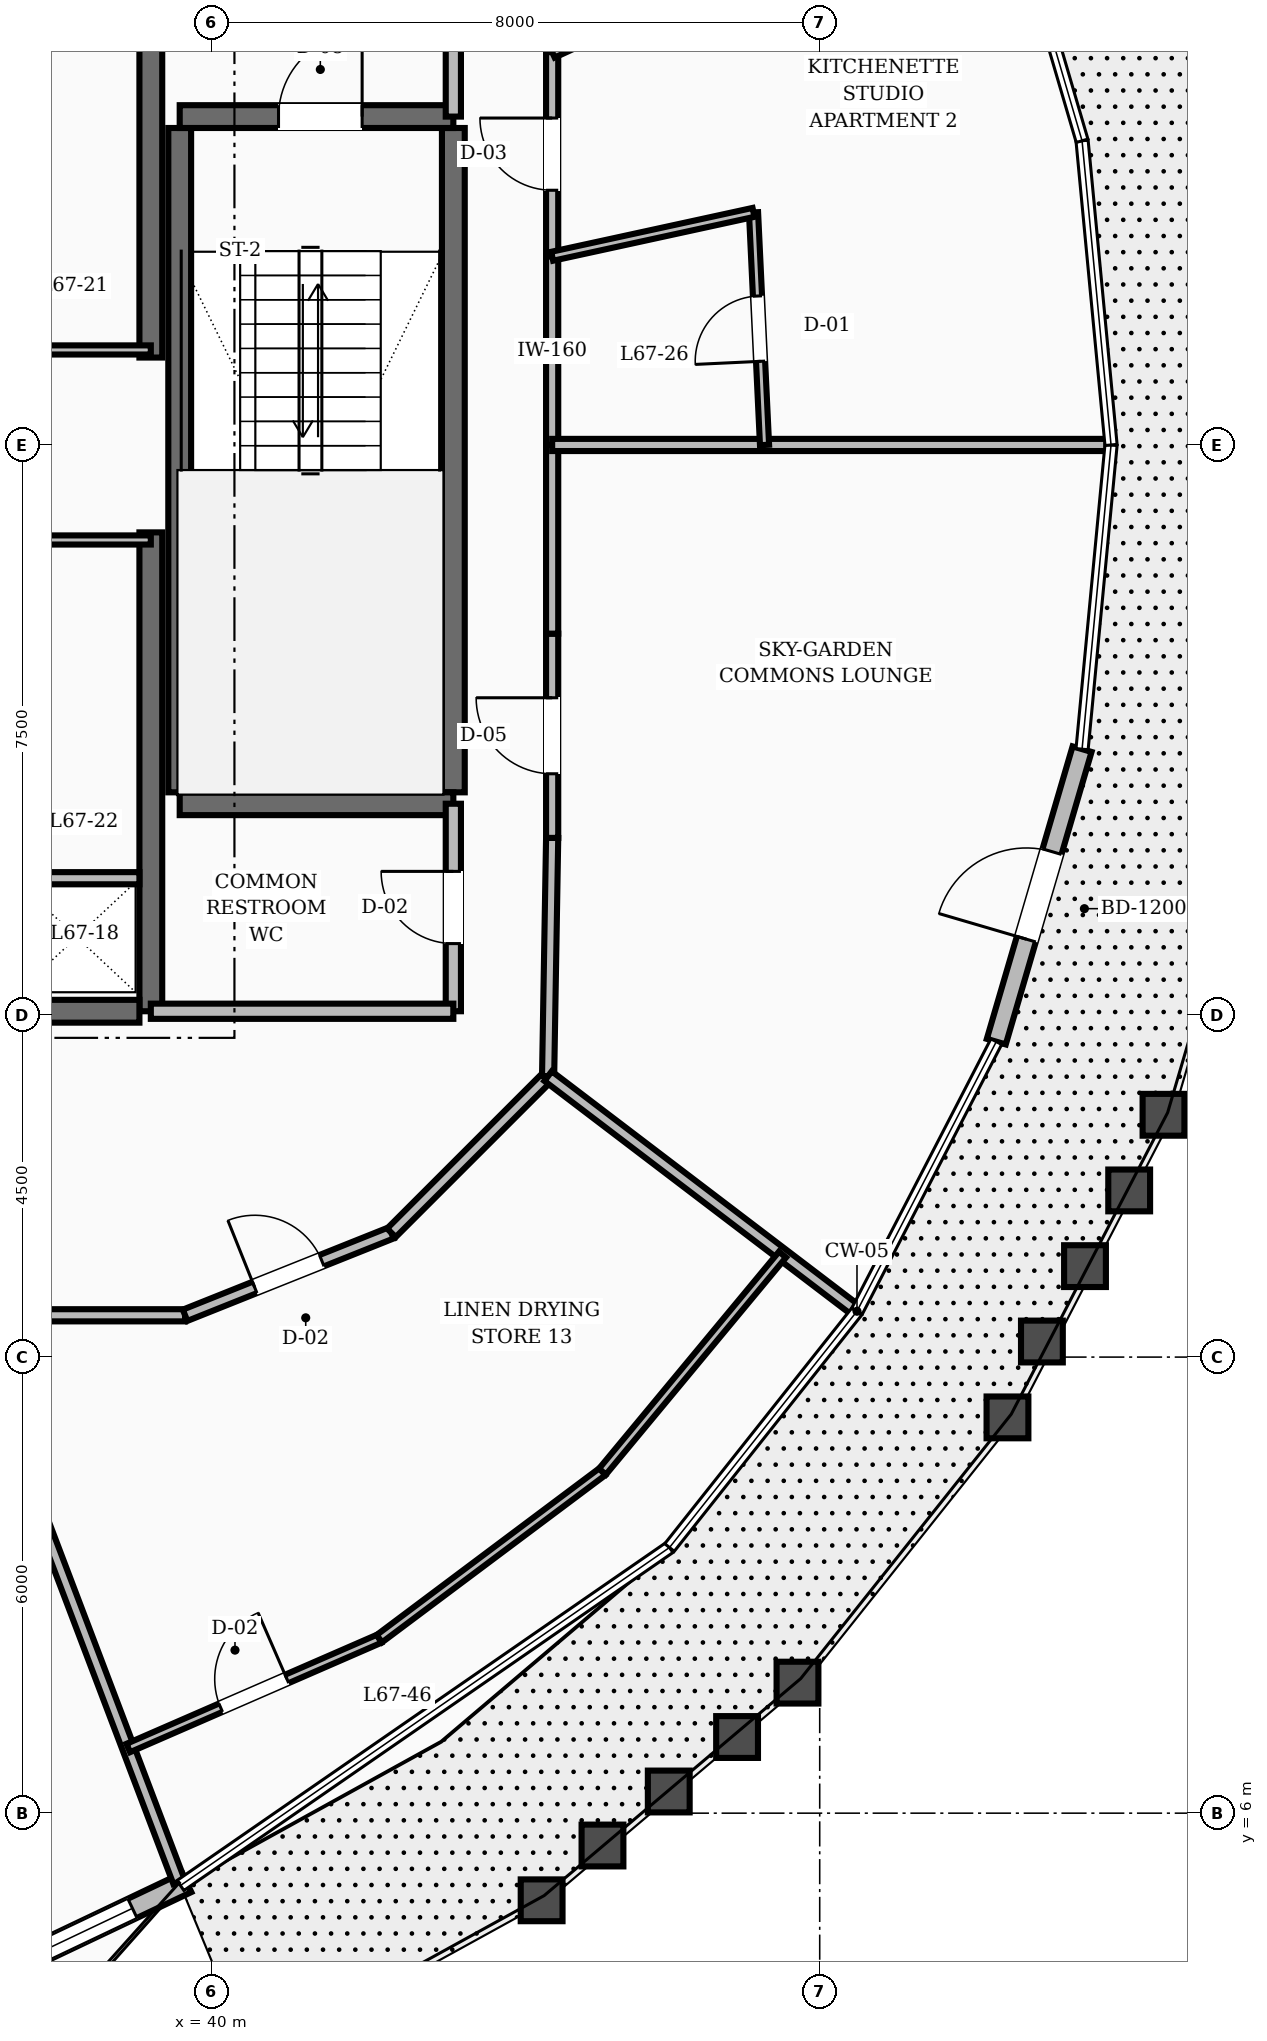
"""IFC4 building model, lengths in metres.
Left out: names, types, materials, properties, quantities, classifications, styles, units other than length and angle.
Written with IfcOpenShell. Run it as: python <this file> out.ifc"""

import sys

from ifc_helpers import new_model, si_unit, direction, frame, frame_2d, origin, place, context, subcontext, project, spatial, rectangle, extrude, element, fill, save


model = new_model("IFC4")
c1 = context("Model", 3, precision=1e-05, world=origin(), true_north=direction((0.0, 1.0)))
c2 = subcontext(c1, "Body", "Model", "MODEL_VIEW")
j1 = project(units=[si_unit("LENGTHUNIT", "METRE"), si_unit("PLANEANGLEUNIT", "RADIAN")], contexts=[c1])
p1 = place(None, origin())
s1 = spatial("IfcSite", under=j1, at=p1, CompositionType="ELEMENT")
p2 = place(p1, origin())
s2 = spatial("IfcBuilding", under=s1, at=p2, CompositionType="ELEMENT")
p3 = place(p2, frame((0.0, 0.0, 258.0)))
s3 = spatial("IfcBuildingStorey", under=s2, at=p3, CompositionType="ELEMENT", Elevation=258.0)
for number, where, z_axis, x_axis in (
    (1, (39.2, 16.55, 0.0), (0.0, 0.0, 1.0), (0.0, 1.0, 0.0)),
    (2, (39.2, 25.15, 0.0), (0.0, 0.0, 1.0), (0.0, 1.0, 0.0)),
):
    element("IfcWall", number, at=place(p3, frame(where, z_axis=z_axis, x_axis=x_axis)), inside=s3, PredefinedType="SHEAR", context=c2, shape_type="SweptSolid", body=[
        extrude(rectangle(XDim=6.3, YDim=0.3, at=frame_2d((3.15, 0.0))), origin(), (0.0, 0.0, 1.0), 3.6),
    ])
p4 = place(p3, frame((35.8, 16.55, 0.0), z_axis=(0.0, 0.0, 1.0), x_axis=(1.0, 0.0, 0.0)))
e3 = element("IfcWall", 3, at=p4, inside=s3, PredefinedType="SHEAR", context=c2, shape_type="SweptSolid", body=[
    extrude(rectangle(XDim=3.25, YDim=0.3, at=frame_2d((1.625, 0.0))), origin(), (0.0, 0.0, 1.0), 3.6),
])
p5 = place(p4, frame((0.3, 0.0, 0.0)))
e4 = element("IfcOpeningElement", 4, at=p5, cuts=e3, PredefinedType="OPENING", context=c2, shape_type="SweptSolid", body=[
    extrude(rectangle(XDim=1.1, YDim=2.1, at=frame_2d((0.55, 1.05))), frame((0.0, 0.16, 0.0), z_axis=(0.0, -1.0, 0.0), x_axis=(1.0, 0.0, 0.0)), (0.0, 0.0, 1.0), 0.32),
])
for number, where, z_axis, x_axis in (
    (5, (43.18, 19.43, 0.0), (0.0, 0.0, 1.0), (0.0, 1.0, 0.0)),
    (6, (39.58, 19.43, 0.0), (0.0, 0.0, 1.0), (0.0, 1.0, 0.0)),
):
    element("IfcWall", number, at=place(p3, frame(where, z_axis=z_axis, x_axis=x_axis)), inside=s3, PredefinedType="SHEAR", context=c2, shape_type="SweptSolid", body=[
        extrude(rectangle(XDim=8.74, YDim=0.3, at=frame_2d((4.37, 0.0))), origin(), (0.0, 0.0, 1.0), 3.6),
    ])
p6 = place(p3, frame((39.58, 19.28, 0.0), z_axis=(0.0, 0.0, 1.0), x_axis=(1.0, 0.0, 0.0)))
e7 = element("IfcWall", 7, at=p6, inside=s3, PredefinedType="SHEAR", context=c2, shape_type="SweptSolid", body=[
    extrude(rectangle(XDim=3.6, YDim=0.3, at=frame_2d((1.8, 0.0))), origin(), (0.0, 0.0, 1.0), 3.6),
])
p7 = place(p3, frame((39.58, 28.32, 0.0), z_axis=(0.0, 0.0, 1.0), x_axis=(1.0, 0.0, 0.0)))
e8 = element("IfcWall", 8, at=p7, inside=s3, PredefinedType="SHEAR", context=c2, shape_type="SweptSolid", body=[
    extrude(rectangle(XDim=3.6, YDim=0.3, at=frame_2d((1.8, 0.0))), origin(), (0.0, 0.0, 1.0), 3.6),
])
p8 = place(p7, frame((1.3, 0.0, 0.0)))
e9 = element("IfcOpeningElement", 9, at=p8, cuts=e8, PredefinedType="OPENING", context=c2, shape_type="SweptSolid", body=[
    extrude(rectangle(XDim=1.1, YDim=2.1, at=frame_2d((0.55, 1.05))), frame((0.0, 0.16, 0.0), z_axis=(0.0, -1.0, 0.0), x_axis=(1.0, 0.0, 0.0)), (0.0, 0.0, 1.0), 0.32),
])
p9 = place(p3, frame((35.979, 3.332, 0.0), z_axis=(0.0, 0.0, 1.0), x_axis=(0.903154871067, 0.429314894765, 0.0)))
e10 = element("IfcWall", 10, at=p9, inside=s3, PredefinedType="STANDARD", context=c2, shape_type="SweptSolid", body=[
    extrude(rectangle(XDim=4.091, YDim=0.28, at=frame_2d((2.045, 0.0))), origin(), (0.0, 0.0, 1.0), 2.88),
])
p10 = place(p9, frame((0.699, 0.0, 0.8)))
e11 = element("IfcOpeningElement", 11, at=p10, cuts=e10, PredefinedType="OPENING", context=c2, shape_type="SweptSolid", body=[
    extrude(rectangle(XDim=2.6, YDim=1.65, at=frame_2d((1.3, 0.825))), frame((0.0, 0.15, 0.0), z_axis=(0.0, -1.0, 0.0), x_axis=(1.0, 0.0, 0.0)), (0.0, 0.0, 1.0), 0.3),
])
p11 = place(p3, frame((50.323, 16.15, 0.0), z_axis=(0.0, 0.0, 1.0), x_axis=(0.281444418765, 0.959577531597, 0.0)))
e12 = element("IfcWall", 12, at=p11, inside=s3, PredefinedType="STANDARD", context=c2, shape_type="SweptSolid", body=[
    extrude(rectangle(XDim=4.01, YDim=0.26, at=frame_2d((2.005, 0.0))), origin(), (0.0, 0.0, 1.0), 2.88),
])
p12 = place(p11, frame((1.405, 0.0, 0.0)))
e13 = element("IfcOpeningElement", 13, at=p12, cuts=e12, PredefinedType="OPENING", context=c2, shape_type="SweptSolid", body=[
    extrude(rectangle(XDim=1.2, YDim=2.15, at=frame_2d((0.6, 1.075))), frame((0.0, 0.14, 0.0), z_axis=(0.0, -1.0, 0.0), x_axis=(1.0, 0.0, 0.0)), (0.0, 0.0, 1.0), 0.28),
])
p13 = place(p3, frame((43.18, 28.32, 0.0), z_axis=(0.0, 0.0, 1.0), x_axis=(0.0, 1.0, 0.0)))
e14 = element("IfcWall", 14, at=p13, inside=s3, PredefinedType="SOLIDWALL", context=c2, shape_type="SweptSolid", body=[
    extrude(rectangle(XDim=3.13, YDim=0.2, at=frame_2d((1.565, 0.0))), origin(), (0.0, 0.0, 1.0), 2.87),
])
p14 = place(p13, frame((1.015, 0.0, 0.0)))
e15 = element("IfcOpeningElement", 15, at=p14, cuts=e14, PredefinedType="OPENING", context=c2, shape_type="SweptSolid", body=[
    extrude(rectangle(XDim=1.1, YDim=2.1, at=frame_2d((0.55, 1.05))), frame((0.0, 0.11, 0.0), z_axis=(0.0, -1.0, 0.0), x_axis=(1.0, 0.0, 0.0)), (0.0, 0.0, 1.0), 0.22),
])
p15 = place(p3, frame((43.18, 16.55, 0.0), z_axis=(0.0, 0.0, 1.0), x_axis=(0.0, 1.0, 0.0)))
e16 = element("IfcWall", 16, at=p15, inside=s3, PredefinedType="SOLIDWALL", context=c2, shape_type="SweptSolid", body=[
    extrude(rectangle(XDim=2.73, YDim=0.2, at=frame_2d((1.365, 0.0))), origin(), (0.0, 0.0, 1.0), 2.87),
])
p16 = place(p15, frame((0.89, 0.0, 0.0)))
e17 = element("IfcOpeningElement", 17, at=p16, cuts=e16, PredefinedType="OPENING", context=c2, shape_type="SweptSolid", body=[
    extrude(rectangle(XDim=0.95, YDim=2.1, at=frame_2d((0.475, 1.05))), frame((0.0, 0.11, 0.0), z_axis=(0.0, -1.0, 0.0), x_axis=(1.0, 0.0, 0.0)), (0.0, 0.0, 1.0), 0.22),
])
p17 = place(p3, frame((39.2, 16.55, 0.0), z_axis=(0.0, 0.0, 1.0), x_axis=(1.0, 0.0, 0.0)))
e18 = element("IfcWall", 18, at=p17, inside=s3, PredefinedType="SOLIDWALL", context=c2, shape_type="SweptSolid", body=[
    extrude(rectangle(XDim=3.98, YDim=0.2, at=frame_2d((1.99, 0.0))), origin(), (0.0, 0.0, 1.0), 2.87),
])
p18 = place(p3, frame((37.4, 18.3, 0.0), z_axis=(0.0, 0.0, 1.0), x_axis=(1.0, 0.0, 0.0)))
e19 = element("IfcWall", 19, at=p18, inside=s3, PredefinedType="SOLIDWALL", context=c2, shape_type="SweptSolid", body=[
    extrude(rectangle(XDim=1.65, YDim=0.16, at=frame_2d((0.825, 0.0))), origin(), (0.0, 0.0, 1.0), 2.87),
])
for number, where, z_axis, x_axis in (
    (20, (37.4, 25.25, 0.0), (0.0, 0.0, 1.0), (1.0, 0.0, 0.0)),
    (21, (37.4, 22.75, 0.0), (0.0, 0.0, 1.0), (1.0, 0.0, 0.0)),
):
    element("IfcWall", number, at=place(p3, frame(where, z_axis=z_axis, x_axis=x_axis)), inside=s3, PredefinedType="PARTITIONING", context=c2, shape_type="SweptSolid", body=[
        extrude(rectangle(XDim=1.8, YDim=0.12, at=frame_2d((0.9, 0.0))), origin(), (0.0, 0.0, 1.0), 2.87),
    ])
p19 = place(p3, frame((44.48, 24.0, 0.0), z_axis=(0.0, 0.0, 1.0), x_axis=(0.0, 1.0, 0.0)))
e22 = element("IfcWall", 22, at=p19, inside=s3, PredefinedType="SOLIDWALL", context=c2, shape_type="SweptSolid", body=[
    extrude(rectangle(XDim=2.482, YDim=0.16, at=frame_2d((1.241, 0.0))), origin(), (0.0, 0.0, 1.0), 2.87),
])
p20 = place(p3, frame((44.48, 26.482, 0.0), z_axis=(0.0, 0.0, 1.0), x_axis=(0.0, 1.0, 0.0)))
e23 = element("IfcWall", 23, at=p20, inside=s3, PredefinedType="SOLIDWALL", context=c2, shape_type="SweptSolid", body=[
    extrude(rectangle(XDim=2.687, YDim=0.16, at=frame_2d((1.344, 0.0))), origin(), (0.0, 0.0, 1.0), 2.87),
])
p21 = place(p20, frame((0.868, 0.0, 0.0)))
e24 = element("IfcOpeningElement", 24, at=p21, cuts=e23, PredefinedType="OPENING", context=c2, shape_type="SweptSolid", body=[
    extrude(rectangle(XDim=0.95, YDim=2.1, at=frame_2d((0.475, 1.05))), frame((0.0, 0.09, 0.0), z_axis=(0.0, -1.0, 0.0), x_axis=(1.0, 0.0, 0.0)), (0.0, 0.0, 1.0), 0.18),
])
p22 = place(p3, frame((44.48, 29.169, 0.0), z_axis=(0.0, 0.0, 1.0), x_axis=(-0.016981035134, 0.999855811828, 0.0)))
e25 = element("IfcWall", 25, at=p22, inside=s3, PredefinedType="SOLIDWALL", context=c2, shape_type="SweptSolid", body=[
    extrude(rectangle(XDim=3.134, YDim=0.16, at=frame_2d((1.567, 0.0))), origin(), (0.0, 0.0, 1.0), 2.87),
])
p23 = place(p3, frame((36.743, 12.55, 0.0), z_axis=(0.0, 0.0, 1.0), x_axis=(1.0, 0.0, 0.0)))
e26 = element("IfcWall", 26, at=p23, inside=s3, PredefinedType="SOLIDWALL", context=c2, shape_type="SweptSolid", body=[
    extrude(rectangle(XDim=2.908, YDim=0.16, at=frame_2d((1.454, 0.0))), origin(), (0.0, 0.0, 1.0), 2.87),
])
p24 = place(p3, frame((39.651, 12.55, 0.0), z_axis=(0.0, 0.0, 1.0), x_axis=(0.92856882165, 0.371160266542, 0.0)))
e27 = element("IfcWall", 27, at=p24, inside=s3, PredefinedType="SOLIDWALL", context=c2, shape_type="SweptSolid", body=[
    extrude(rectangle(XDim=2.923, YDim=0.16, at=frame_2d((1.461, 0.0))), origin(), (0.0, 0.0, 1.0), 2.87),
])
p25 = place(p24, frame((0.987, 0.0, 0.0)))
e28 = element("IfcOpeningElement", 28, at=p25, cuts=e27, PredefinedType="OPENING", context=c2, shape_type="SweptSolid", body=[
    extrude(rectangle(XDim=0.95, YDim=2.1, at=frame_2d((0.475, 1.05))), frame((0.0, 0.09, 0.0), z_axis=(0.0, -1.0, 0.0), x_axis=(1.0, 0.0, 0.0)), (0.0, 0.0, 1.0), 0.18),
])
p26 = place(p3, frame((42.365, 13.635, 0.0), z_axis=(0.0, 0.0, 1.0), x_axis=(0.707106781187, 0.707106781187, 0.0)))
e29 = element("IfcWall", 29, at=p26, inside=s3, PredefinedType="SOLIDWALL", context=c2, shape_type="SweptSolid", body=[
    extrude(rectangle(XDim=2.916, YDim=0.16, at=frame_2d((1.458, 0.0))), origin(), (0.0, 0.0, 1.0), 2.87),
])
p27 = place(p3, frame((44.427, 15.697, 0.0), z_axis=(0.0, 0.0, 1.0), x_axis=(0.016981035134, 0.999855811828, 0.0)))
e30 = element("IfcWall", 30, at=p27, inside=s3, PredefinedType="SOLIDWALL", context=c2, shape_type="SweptSolid", body=[
    extrude(rectangle(XDim=3.134, YDim=0.16, at=frame_2d((1.567, 0.0))), origin(), (0.0, 0.0, 1.0), 2.87),
])
p28 = place(p3, frame((44.48, 18.831, 0.0), z_axis=(0.0, 0.0, 1.0), x_axis=(0.0, 1.0, 0.0)))
e31 = element("IfcWall", 31, at=p28, inside=s3, PredefinedType="SOLIDWALL", context=c2, shape_type="SweptSolid", body=[
    extrude(rectangle(XDim=2.687, YDim=0.16, at=frame_2d((1.344, 0.0))), origin(), (0.0, 0.0, 1.0), 2.87),
])
p29 = place(p28, frame((0.844, 0.0, 0.0)))
e32 = element("IfcOpeningElement", 32, at=p29, cuts=e31, PredefinedType="OPENING", context=c2, shape_type="SweptSolid", body=[
    extrude(rectangle(XDim=1.0, YDim=2.1, at=frame_2d((0.5, 1.05))), frame((0.0, 0.09, 0.0), z_axis=(0.0, -1.0, 0.0), x_axis=(1.0, 0.0, 0.0)), (0.0, 0.0, 1.0), 0.18),
])
p30 = place(p3, frame((44.48, 21.518, 0.0), z_axis=(0.0, 0.0, 1.0), x_axis=(0.0, 1.0, 0.0)))
e33 = element("IfcWall", 33, at=p30, inside=s3, PredefinedType="SOLIDWALL", context=c2, shape_type="SweptSolid", body=[
    extrude(rectangle(XDim=2.482, YDim=0.16, at=frame_2d((1.241, 0.0))), origin(), (0.0, 0.0, 1.0), 2.87),
])
p31 = place(p3, frame((44.427, 15.697, 0.0), z_axis=(0.0, 0.0, 1.0), x_axis=(0.795704263552, -0.605685334943, 0.0)))
e34 = element("IfcWall", 34, at=p31, inside=s3, PredefinedType="SOLIDWALL", context=c2, shape_type="SweptSolid", body=[
    extrude(rectangle(XDim=5.057, YDim=0.16, at=frame_2d((2.529, 0.0))), origin(), (0.0, 0.0, 1.0), 2.87),
])
p32 = place(p3, frame((44.48, 24.0, 0.0), z_axis=(0.0, 0.0, 1.0), x_axis=(1.0, 0.0, 0.0)))
e35 = element("IfcWall", 35, at=p32, inside=s3, PredefinedType="SOLIDWALL", context=c2, shape_type="SweptSolid", body=[
    extrude(rectangle(XDim=7.303, YDim=0.16, at=frame_2d((3.651, 0.0))), origin(), (0.0, 0.0, 1.0), 2.87),
])
p33 = place(p3, frame((47.274, 24.0, 0.0), z_axis=(0.0, 0.0, 1.0), x_axis=(-0.047341736084, 0.998878751413, 0.0)))
e36 = element("IfcWall", 36, at=p33, inside=s3, PredefinedType="PARTITIONING", context=c2, shape_type="SweptSolid", body=[
    extrude(rectangle(XDim=3.063, YDim=0.12, at=frame_2d((1.532, 0.0))), origin(), (0.0, 0.0, 1.0), 2.87),
])
p34 = place(p33, frame((1.102, 0.0, 0.0)))
e37 = element("IfcOpeningElement", 37, at=p34, cuts=e36, PredefinedType="OPENING", context=c2, shape_type="SweptSolid", body=[
    extrude(rectangle(XDim=0.86, YDim=2.1, at=frame_2d((0.43, 1.05))), frame((0.0, 0.07, 0.0), z_axis=(0.0, -1.0, 0.0), x_axis=(1.0, 0.0, 0.0)), (0.0, 0.0, 1.0), 0.14),
])
p35 = place(p3, frame((44.48, 26.482, 0.0), z_axis=(0.0, 0.0, 1.0), x_axis=(0.977062450347, 0.212952971622, 0.0)))
e38 = element("IfcWall", 38, at=p35, inside=s3, PredefinedType="PARTITIONING", context=c2, shape_type="SweptSolid", body=[
    extrude(rectangle(XDim=2.711, YDim=0.12, at=frame_2d((1.356, 0.0))), origin(), (0.0, 0.0, 1.0), 2.87),
])
p36 = place(p3, frame((44.48, 29.169, 0.0), z_axis=(0.0, 0.0, 1.0), x_axis=(0.908905892695, 0.417001292833, 0.0)))
e39 = element("IfcWall", 39, at=p36, inside=s3, PredefinedType="SOLIDWALL", context=c2, shape_type="SweptSolid", body=[
    extrude(rectangle(XDim=6.379, YDim=0.16, at=frame_2d((3.189, 0.0))), origin(), (0.0, 0.0, 1.0), 2.87),
])
p37 = place(p3, frame((36.743, 12.55, 0.0), z_axis=(0.0, 0.0, 1.0), x_axis=(0.354824979058, -0.934932743162, 0.0)))
e40 = element("IfcWall", 40, at=p37, inside=s3, PredefinedType="SOLIDWALL", context=c2, shape_type="SweptSolid", body=[
    extrude(rectangle(XDim=7.974, YDim=0.16, at=frame_2d((3.987, 0.0))), origin(), (0.0, 0.0, 1.0), 2.87),
])
p38 = place(p3, frame((38.903, 6.857, 0.0), z_axis=(0.0, 0.0, 1.0), x_axis=(0.916826396338, 0.399286061588, 0.0)))
e41 = element("IfcWall", 41, at=p38, inside=s3, PredefinedType="PARTITIONING", context=c2, shape_type="SweptSolid", body=[
    extrude(rectangle(XDim=3.603, YDim=0.12, at=frame_2d((1.801, 0.0))), origin(), (0.0, 0.0, 1.0), 2.87),
])
p39 = place(p38, frame((1.326, 0.0, 0.0)))
e42 = element("IfcOpeningElement", 42, at=p39, cuts=e41, PredefinedType="OPENING", context=c2, shape_type="SweptSolid", body=[
    extrude(rectangle(XDim=0.95, YDim=2.1, at=frame_2d((0.475, 1.05))), frame((0.0, 0.07, 0.0), z_axis=(0.0, -1.0, 0.0), x_axis=(1.0, 0.0, 0.0)), (0.0, 0.0, 1.0), 0.14),
])
p40 = place(p3, frame((42.206, 8.296, 0.0), z_axis=(0.0, 0.0, 1.0), x_axis=(0.800519042287, 0.599307319274, 0.0)))
e43 = element("IfcWall", 43, at=p40, inside=s3, PredefinedType="PARTITIONING", context=c2, shape_type="SweptSolid", body=[
    extrude(rectangle(XDim=3.667, YDim=0.12, at=frame_2d((1.833, 0.0))), origin(), (0.0, 0.0, 1.0), 2.87),
])
p41 = place(p3, frame((45.142, 10.493, 0.0), z_axis=(0.0, 0.0, 1.0), x_axis=(0.638390065539, 0.769713014195, 0.0)))
e44 = element("IfcWall", 44, at=p41, inside=s3, PredefinedType="PARTITIONING", context=c2, shape_type="SweptSolid", body=[
    extrude(rectangle(XDim=3.711, YDim=0.12, at=frame_2d((1.855, 0.0))), origin(), (0.0, 0.0, 1.0), 2.87),
])
p42 = place(p10, origin())
e45 = element("IfcWindow", 45, at=p42, inside=s3, PartitioningType="SINGLE_PANEL", PredefinedType="WINDOW", context=c2, shape_type="SweptSolid", body=[
    extrude(rectangle(XDim=2.6, YDim=1.65, at=frame_2d((1.3, 0.825))), frame((0.0, 0.03, 0.0), z_axis=(0.0, -1.0, 0.0), x_axis=(1.0, 0.0, 0.0)), (0.0, 0.0, 1.0), 0.06),
])
fill(e11, e45)
p43 = place(p12, origin())
e46 = element("IfcDoor", 46, at=p43, inside=s3, OperationType="SINGLE_SWING_LEFT", PredefinedType="DOOR", context=c2, shape_type="SweptSolid", body=[
    extrude(rectangle(XDim=1.2, YDim=2.15, at=frame_2d((0.6, 1.075))), frame((0.0, 0.025, 0.0), z_axis=(0.0, -1.0, 0.0), x_axis=(1.0, 0.0, 0.0)), (0.0, 0.0, 1.0), 0.05),
])
fill(e13, e46)
p44 = place(p8, origin())
e47 = element("IfcDoor", 47, at=p44, inside=s3, OperationType="SINGLE_SWING_RIGHT", PredefinedType="DOOR", context=c2, shape_type="SweptSolid", body=[
    extrude(rectangle(XDim=1.1, YDim=2.1, at=frame_2d((0.55, 1.05))), frame((0.0, 0.025, 0.0), z_axis=(0.0, -1.0, 0.0), x_axis=(1.0, 0.0, 0.0)), (0.0, 0.0, 1.0), 0.05),
])
fill(e9, e47)
p45 = place(p16, origin())
e48 = element("IfcDoor", 48, at=p45, inside=s3, OperationType="SINGLE_SWING_RIGHT", PredefinedType="DOOR", context=c2, shape_type="SweptSolid", body=[
    extrude(rectangle(XDim=0.95, YDim=2.1, at=frame_2d((0.475, 1.05))), frame((0.0, 0.025, 0.0), z_axis=(0.0, -1.0, 0.0), x_axis=(1.0, 0.0, 0.0)), (0.0, 0.0, 1.0), 0.05),
])
fill(e17, e48)
p46 = place(p29, origin())
e49 = element("IfcDoor", 49, at=p46, inside=s3, OperationType="SINGLE_SWING_RIGHT", PredefinedType="DOOR", context=c2, shape_type="SweptSolid", body=[
    extrude(rectangle(XDim=1.0, YDim=2.1, at=frame_2d((0.5, 1.05))), frame((0.0, 0.025, 0.0), z_axis=(0.0, -1.0, 0.0), x_axis=(1.0, 0.0, 0.0)), (0.0, 0.0, 1.0), 0.05),
])
fill(e32, e49)
p47 = place(p34, origin())
e50 = element("IfcDoor", 50, at=p47, inside=s3, OperationType="SINGLE_SWING_LEFT", PredefinedType="DOOR", context=c2, shape_type="SweptSolid", body=[
    extrude(rectangle(XDim=0.86, YDim=2.1, at=frame_2d((0.43, 1.05))), frame((0.0, 0.025, 0.0), z_axis=(0.0, -1.0, 0.0), x_axis=(1.0, 0.0, 0.0)), (0.0, 0.0, 1.0), 0.05),
])
fill(e37, e50)
p48 = place(p21, origin())
e51 = element("IfcDoor", 51, at=p48, inside=s3, OperationType="SINGLE_SWING_RIGHT", PredefinedType="DOOR", context=c2, shape_type="SweptSolid", body=[
    extrude(rectangle(XDim=0.95, YDim=2.1, at=frame_2d((0.475, 1.05))), frame((0.0, 0.025, 0.0), z_axis=(0.0, -1.0, 0.0), x_axis=(1.0, 0.0, 0.0)), (0.0, 0.0, 1.0), 0.05),
])
fill(e24, e51)
p49 = place(p25, origin())
e52 = element("IfcDoor", 52, at=p49, inside=s3, OperationType="SINGLE_SWING_LEFT", PredefinedType="DOOR", context=c2, shape_type="SweptSolid", body=[
    extrude(rectangle(XDim=0.95, YDim=2.1, at=frame_2d((0.475, 1.05))), frame((0.0, 0.025, 0.0), z_axis=(0.0, -1.0, 0.0), x_axis=(1.0, 0.0, 0.0)), (0.0, 0.0, 1.0), 0.05),
])
fill(e28, e52)
p50 = place(p39, origin())
e53 = element("IfcDoor", 53, at=p50, inside=s3, OperationType="SINGLE_SWING_RIGHT", PredefinedType="DOOR", context=c2, shape_type="SweptSolid", body=[
    extrude(rectangle(XDim=0.95, YDim=2.1, at=frame_2d((0.475, 1.05))), frame((0.0, 0.025, 0.0), z_axis=(0.0, -1.0, 0.0), x_axis=(1.0, 0.0, 0.0)), (0.0, 0.0, 1.0), 0.05),
])
fill(e42, e53)
save(model, sys.argv[1])
